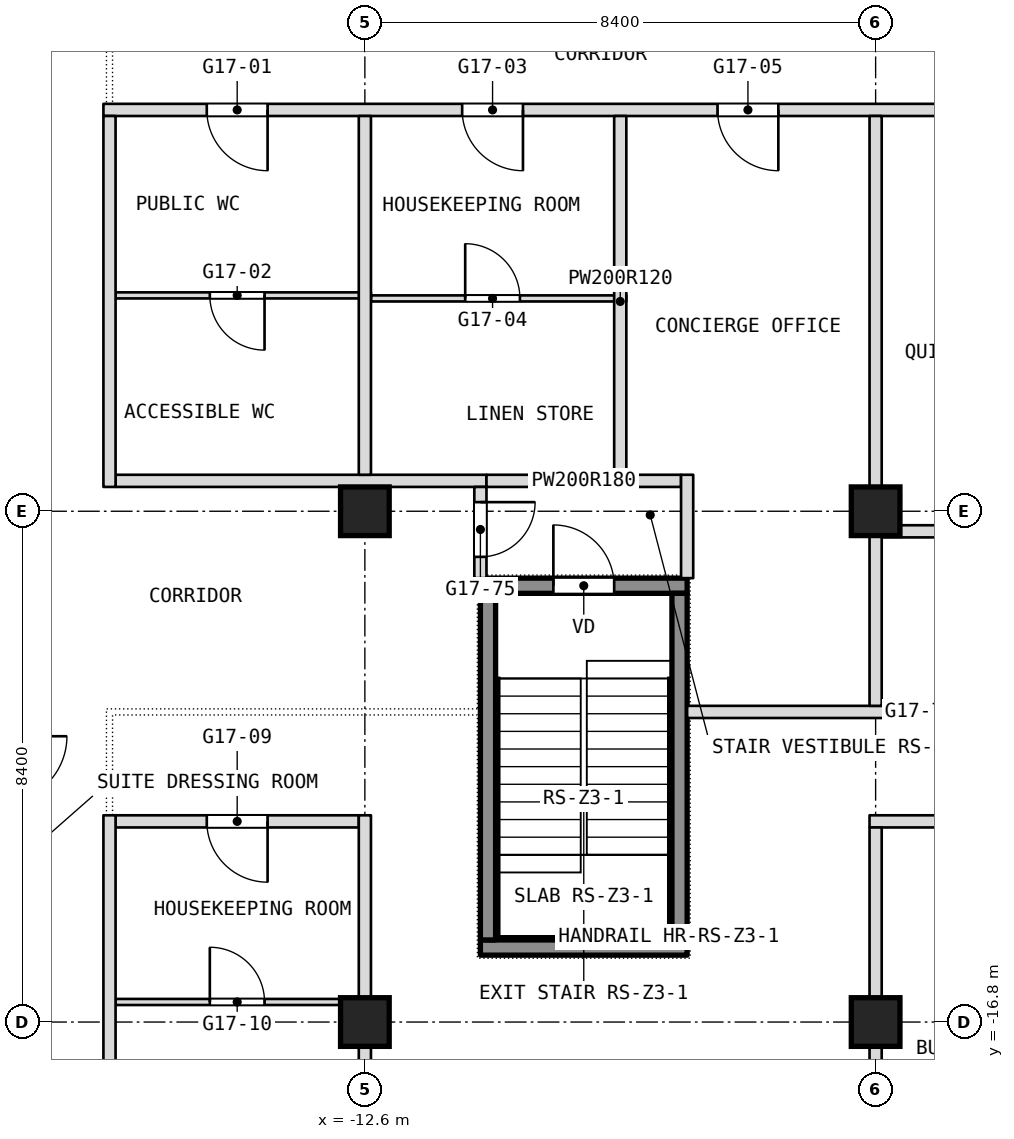
"""IFC4 building model, lengths in metres.
Left out: names, types, materials, properties, quantities, classifications, styles, units other than length and angle.
Written with IfcOpenShell. Run it as: python <this file> out.ifc"""

import sys

from ifc_helpers import new_model, si_unit, direction, frame, frame_2d, origin, origin_2d, place, context, subcontext, project, spatial, rectangle, extrude, element, fill, save


model = new_model("IFC4")
c1 = context("Model", 3, precision=1e-05, world=origin(), true_north=direction((0.0, 1.0)))
c2 = subcontext(c1, "Body", "Model", "MODEL_VIEW")
j1 = project(units=[si_unit("LENGTHUNIT", "METRE"), si_unit("PLANEANGLEUNIT", "RADIAN")], contexts=[c1])
p1 = place(None, origin())
s1 = spatial("IfcSite", under=j1, at=p1, CompositionType="ELEMENT")
p2 = place(p1, origin())
s2 = spatial("IfcBuilding", under=s1, at=p2, CompositionType="ELEMENT")
p3 = place(p2, frame((0.0, 0.0, 212.9)))
s3 = spatial("IfcBuildingStorey", under=s2, at=p3, CompositionType="ELEMENT", Elevation=212.9)
for number, where, z_axis, x_axis in (
    (1, (-12.6, -16.8, 0.0), (0.0, 0.0, 1.0), (1.0, 0.0, 0.0)),
    (2, (-12.6, -8.4, 0.0), (0.0, 0.0, 1.0), (1.0, 0.0, 0.0)),
    (3, (-4.2, -16.8, 0.0), (0.0, 0.0, 1.0), (1.0, 0.0, 0.0)),
    (4, (-4.2, -8.4, 0.0), (0.0, 0.0, 1.0), (1.0, 0.0, 0.0)),
):
    element("IfcColumn", number, at=place(p3, frame(where, z_axis=z_axis, x_axis=x_axis)), inside=s3, PredefinedType="COLUMN", context=c2, shape_type="SweptSolid", body=[
        extrude(rectangle(XDim=0.8, YDim=0.8, at=origin_2d()), origin(), (0.0, 0.0, 1.0), 3.6),
    ])
p4 = place(p3, frame((-16.7, -16.47, 0.0), z_axis=(0.0, 0.0, 1.0), x_axis=(1.0, 0.0, 0.0)))
e5 = element("IfcWall", 5, at=p4, inside=s3, PredefinedType="PARTITIONING", context=c2, shape_type="SweptSolid", body=[
    extrude(rectangle(XDim=4.0, YDim=0.1, at=frame_2d((2.0, 0.0))), origin(), (0.0, 0.0, 1.0), 3.34),
])
p5 = place(p4, frame((1.55, 0.0, 0.0)))
e6 = element("IfcOpeningElement", 6, at=p5, cuts=e5, PredefinedType="OPENING", context=c2, shape_type="SweptSolid", body=[
    extrude(rectangle(XDim=0.9, YDim=2.1, at=frame_2d((0.45, 1.05))), frame((0.0, 0.05, 0.0), z_axis=(0.0, -1.0, 0.0), x_axis=(1.0, 0.0, 0.0)), (0.0, 0.0, 1.0), 0.1),
])
p6 = place(p3, frame((-16.7, -13.5, 0.0), z_axis=(0.0, 0.0, 1.0), x_axis=(1.0, 0.0, 0.0)))
e7 = element("IfcWall", 7, at=p6, inside=s3, PredefinedType="PARTITIONING", context=c2, shape_type="SweptSolid", body=[
    extrude(rectangle(XDim=4.0, YDim=0.2, at=frame_2d((2.0, 0.0))), origin(), (0.0, 0.0, 1.0), 3.34),
])
p7 = place(p6, frame((1.5, 0.0, 0.0)))
e8 = element("IfcOpeningElement", 8, at=p7, cuts=e7, PredefinedType="OPENING", context=c2, shape_type="SweptSolid", body=[
    extrude(rectangle(XDim=1.0, YDim=2.1, at=frame_2d((0.5, 1.05))), frame((0.0, 0.1, 0.0), z_axis=(0.0, -1.0, 0.0), x_axis=(1.0, 0.0, 0.0)), (0.0, 0.0, 1.0), 0.2),
])
p8 = place(p3, frame((-4.3, -13.5, 0.0), z_axis=(0.0, 0.0, 1.0), x_axis=(1.0, 0.0, 0.0)))
e9 = element("IfcWall", 9, at=p8, inside=s3, PredefinedType="PARTITIONING", context=c2, shape_type="SweptSolid", body=[
    extrude(rectangle(XDim=10.0, YDim=0.2, at=frame_2d((5.0, 0.0))), origin(), (0.0, 0.0, 1.0), 3.34),
])
p9 = place(p8, frame((1.7, 0.0, 0.0)))
e10 = element("IfcOpeningElement", 10, at=p9, cuts=e9, PredefinedType="OPENING", context=c2, shape_type="SweptSolid", body=[
    extrude(rectangle(XDim=1.0, YDim=2.1, at=frame_2d((0.5, 1.05))), frame((0.0, 0.1, 0.0), z_axis=(0.0, -1.0, 0.0), x_axis=(1.0, 0.0, 0.0)), (0.0, 0.0, 1.0), 0.2),
])
p10 = place(p8, frame((5.9, 0.0, 0.0)))
e11 = element("IfcOpeningElement", 11, at=p10, cuts=e9, PredefinedType="OPENING", context=c2, shape_type="SweptSolid", body=[
    extrude(rectangle(XDim=1.0, YDim=2.1, at=frame_2d((0.5, 1.05))), frame((0.0, 0.1, 0.0), z_axis=(0.0, -1.0, 0.0), x_axis=(1.0, 0.0, 0.0)), (0.0, 0.0, 1.0), 0.2),
])
p11 = place(p8, frame((8.85, 0.0, 0.0)))
e12 = element("IfcOpeningElement", 12, at=p11, cuts=e9, PredefinedType="OPENING", context=c2, shape_type="SweptSolid", body=[
    extrude(rectangle(XDim=1.0, YDim=2.1, at=frame_2d((0.5, 1.05))), frame((0.0, 0.1, 0.0), z_axis=(0.0, -1.0, 0.0), x_axis=(1.0, 0.0, 0.0)), (0.0, 0.0, 1.0), 0.2),
])
p12 = place(p3, frame((-7.3, -11.7, 0.0), z_axis=(0.0, 0.0, 1.0), x_axis=(1.0, 0.0, 0.0)))
e13 = element("IfcWall", 13, at=p12, inside=s3, PredefinedType="PARTITIONING", context=c2, shape_type="SweptSolid", body=[
    extrude(rectangle(XDim=14.6, YDim=0.2, at=frame_2d((7.3, 0.0))), origin(), (0.0, 0.0, 1.0), 3.34),
])
p13 = place(p12, frame((4.7, 0.0, 0.0)))
e14 = element("IfcOpeningElement", 14, at=p13, cuts=e13, PredefinedType="OPENING", context=c2, shape_type="SweptSolid", body=[
    extrude(rectangle(XDim=1.0, YDim=2.1, at=frame_2d((0.5, 1.05))), frame((0.0, 0.1, 0.0), z_axis=(0.0, -1.0, 0.0), x_axis=(1.0, 0.0, 0.0)), (0.0, 0.0, 1.0), 0.2),
])
p14 = place(p12, frame((8.9, 0.0, 0.0)))
e15 = element("IfcOpeningElement", 15, at=p14, cuts=e13, PredefinedType="OPENING", context=c2, shape_type="SweptSolid", body=[
    extrude(rectangle(XDim=1.0, YDim=2.1, at=frame_2d((0.5, 1.05))), frame((0.0, 0.1, 0.0), z_axis=(0.0, -1.0, 0.0), x_axis=(1.0, 0.0, 0.0)), (0.0, 0.0, 1.0), 0.2),
])
p15 = place(p3, frame((-4.1, -8.73, 0.0), z_axis=(0.0, 0.0, 1.0), x_axis=(1.0, 0.0, 0.0)))
e16 = element("IfcWall", 16, at=p15, inside=s3, PredefinedType="PARTITIONING", context=c2, shape_type="SweptSolid", body=[
    extrude(rectangle(XDim=8.2, YDim=0.2, at=frame_2d((4.1, 0.0))), origin(), (0.0, 0.0, 1.0), 3.34),
])
p16 = place(p3, frame((-16.7, -7.9, 0.0), z_axis=(0.0, 0.0, 1.0), x_axis=(1.0, 0.0, 0.0)))
e17 = element("IfcWall", 17, at=p16, inside=s3, PredefinedType="PARTITIONING", context=c2, shape_type="SweptSolid", body=[
    extrude(rectangle(XDim=6.1, YDim=0.2, at=frame_2d((3.05, 0.0))), origin(), (0.0, 0.0, 1.0), 3.34),
])
p17 = place(p3, frame((-10.6, -7.9, 0.0), z_axis=(0.0, 0.0, 1.0), x_axis=(1.0, 0.0, 0.0)))
e18 = element("IfcWall", 18, at=p17, inside=s3, PredefinedType="PARTITIONING", context=c2, shape_type="SweptSolid", body=[
    extrude(rectangle(XDim=3.2, YDim=0.2, at=frame_2d((1.6, 0.0))), origin(), (0.0, 0.0, 1.0), 3.34),
])
p18 = place(p3, frame((-12.5, -4.9, 0.0), z_axis=(0.0, 0.0, 1.0), x_axis=(1.0, 0.0, 0.0)))
e19 = element("IfcWall", 19, at=p18, inside=s3, PredefinedType="PARTITIONING", context=c2, shape_type="SweptSolid", body=[
    extrude(rectangle(XDim=4.2, YDim=0.1, at=frame_2d((2.1, 0.0))), origin(), (0.0, 0.0, 1.0), 3.34),
])
p19 = place(p18, frame((1.55, 0.0, 0.0)))
e20 = element("IfcOpeningElement", 20, at=p19, cuts=e19, PredefinedType="OPENING", context=c2, shape_type="SweptSolid", body=[
    extrude(rectangle(XDim=0.9, YDim=2.1, at=frame_2d((0.45, 1.05))), frame((0.0, 0.05, 0.0), z_axis=(0.0, -1.0, 0.0), x_axis=(1.0, 0.0, 0.0)), (0.0, 0.0, 1.0), 0.1),
])
p20 = place(p3, frame((-16.7, -4.85, 0.0), z_axis=(0.0, 0.0, 1.0), x_axis=(1.0, 0.0, 0.0)))
e21 = element("IfcWall", 21, at=p20, inside=s3, PredefinedType="PARTITIONING", context=c2, shape_type="SweptSolid", body=[
    extrude(rectangle(XDim=4.2, YDim=0.1, at=frame_2d((2.1, 0.0))), origin(), (0.0, 0.0, 1.0), 3.34),
])
p21 = place(p20, frame((1.55, 0.0, 0.0)))
e22 = element("IfcOpeningElement", 22, at=p21, cuts=e21, PredefinedType="OPENING", context=c2, shape_type="SweptSolid", body=[
    extrude(rectangle(XDim=0.9, YDim=2.1, at=frame_2d((0.45, 1.05))), frame((0.0, 0.05, 0.0), z_axis=(0.0, -1.0, 0.0), x_axis=(1.0, 0.0, 0.0)), (0.0, 0.0, 1.0), 0.1),
])
p22 = place(p3, frame((-16.9, -1.8, 0.0), z_axis=(0.0, 0.0, 1.0), x_axis=(1.0, 0.0, 0.0)))
e23 = element("IfcWall", 23, at=p22, inside=s3, PredefinedType="PARTITIONING", context=c2, shape_type="SweptSolid", body=[
    extrude(rectangle(XDim=33.8, YDim=0.2, at=frame_2d((16.9, 0.0))), origin(), (0.0, 0.0, 1.0), 3.34),
])
p23 = place(p22, frame((1.7, 0.0, 0.0)))
e24 = element("IfcOpeningElement", 24, at=p23, cuts=e23, PredefinedType="OPENING", context=c2, shape_type="SweptSolid", body=[
    extrude(rectangle(XDim=1.0, YDim=2.1, at=frame_2d((0.5, 1.05))), frame((0.0, 0.1, 0.0), z_axis=(0.0, -1.0, 0.0), x_axis=(1.0, 0.0, 0.0)), (0.0, 0.0, 1.0), 0.2),
])
p24 = place(p22, frame((5.9, 0.0, 0.0)))
e25 = element("IfcOpeningElement", 25, at=p24, cuts=e23, PredefinedType="OPENING", context=c2, shape_type="SweptSolid", body=[
    extrude(rectangle(XDim=1.0, YDim=2.1, at=frame_2d((0.5, 1.05))), frame((0.0, 0.1, 0.0), z_axis=(0.0, -1.0, 0.0), x_axis=(1.0, 0.0, 0.0)), (0.0, 0.0, 1.0), 0.2),
])
p25 = place(p22, frame((10.1, 0.0, 0.0)))
e26 = element("IfcOpeningElement", 26, at=p25, cuts=e23, PredefinedType="OPENING", context=c2, shape_type="SweptSolid", body=[
    extrude(rectangle(XDim=1.0, YDim=2.1, at=frame_2d((0.5, 1.05))), frame((0.0, 0.1, 0.0), z_axis=(0.0, -1.0, 0.0), x_axis=(1.0, 0.0, 0.0)), (0.0, 0.0, 1.0), 0.2),
])
p26 = place(p22, frame((22.7, 0.0, 0.0)))
e27 = element("IfcOpeningElement", 27, at=p26, cuts=e23, PredefinedType="OPENING", context=c2, shape_type="SweptSolid", body=[
    extrude(rectangle(XDim=1.0, YDim=2.1, at=frame_2d((0.5, 1.05))), frame((0.0, 0.1, 0.0), z_axis=(0.0, -1.0, 0.0), x_axis=(1.0, 0.0, 0.0)), (0.0, 0.0, 1.0), 0.2),
])
p27 = place(p22, frame((26.9, 0.0, 0.0)))
e28 = element("IfcOpeningElement", 28, at=p27, cuts=e23, PredefinedType="OPENING", context=c2, shape_type="SweptSolid", body=[
    extrude(rectangle(XDim=1.0, YDim=2.1, at=frame_2d((0.5, 1.05))), frame((0.0, 0.1, 0.0), z_axis=(0.0, -1.0, 0.0), x_axis=(1.0, 0.0, 0.0)), (0.0, 0.0, 1.0), 0.2),
])
p28 = place(p22, frame((31.1, 0.0, 0.0)))
e29 = element("IfcOpeningElement", 29, at=p28, cuts=e23, PredefinedType="OPENING", context=c2, shape_type="SweptSolid", body=[
    extrude(rectangle(XDim=1.0, YDim=2.1, at=frame_2d((0.5, 1.05))), frame((0.0, 0.1, 0.0), z_axis=(0.0, -1.0, 0.0), x_axis=(1.0, 0.0, 0.0)), (0.0, 0.0, 1.0), 0.2),
])
p29 = place(p22, frame((14.3, 0.0, 0.0)))
e30 = element("IfcOpeningElement", 30, at=p29, cuts=e23, PredefinedType="OPENING", context=c2, shape_type="SweptSolid", body=[
    extrude(rectangle(XDim=1.0, YDim=2.1, at=frame_2d((0.5, 1.05))), frame((0.0, 0.1, 0.0), z_axis=(0.0, -1.0, 0.0), x_axis=(1.0, 0.0, 0.0)), (0.0, 0.0, 1.0), 0.2),
])
p30 = place(p22, frame((18.5, 0.0, 0.0)))
e31 = element("IfcOpeningElement", 31, at=p30, cuts=e23, PredefinedType="OPENING", context=c2, shape_type="SweptSolid", body=[
    extrude(rectangle(XDim=1.0, YDim=2.1, at=frame_2d((0.5, 1.05))), frame((0.0, 0.1, 0.0), z_axis=(0.0, -1.0, 0.0), x_axis=(1.0, 0.0, 0.0)), (0.0, 0.0, 1.0), 0.2),
])
p31 = place(p3, frame((-4.2, -11.6, 0.0), z_axis=(0.0, 0.0, 1.0), x_axis=(0.0, 1.0, 0.0)))
e32 = element("IfcWall", 32, at=p31, inside=s3, PredefinedType="PARTITIONING", context=c2, shape_type="SweptSolid", body=[
    extrude(rectangle(XDim=9.7, YDim=0.2, at=frame_2d((4.85, 0.0))), origin(), (0.0, 0.0, 1.0), 3.34),
])
p32 = place(p3, frame((-4.2, -20.2, 0.0), z_axis=(0.0, 0.0, 1.0), x_axis=(0.0, 1.0, 0.0)))
e33 = element("IfcWall", 33, at=p32, inside=s3, PredefinedType="PARTITIONING", context=c2, shape_type="SweptSolid", body=[
    extrude(rectangle(XDim=6.6, YDim=0.2, at=frame_2d((3.3, 0.0))), origin(), (0.0, 0.0, 1.0), 3.34),
])
p33 = place(p3, frame((-7.3, -9.5, 0.0), z_axis=(0.0, 0.0, 1.0), x_axis=(0.0, 1.0, 0.0)))
e34 = element("IfcWall", 34, at=p33, inside=s3, PredefinedType="PARTITIONING", context=c2, shape_type="SweptSolid", body=[
    extrude(rectangle(XDim=1.7, YDim=0.2, at=frame_2d((0.85, 0.0))), origin(), (0.0, 0.0, 1.0), 3.34),
])
p34 = place(p3, frame((-8.4, -8.0, 0.0), z_axis=(0.0, 0.0, 1.0), x_axis=(0.0, 1.0, 0.0)))
e35 = element("IfcWall", 35, at=p34, inside=s3, PredefinedType="PARTITIONING", context=c2, shape_type="SweptSolid", body=[
    extrude(rectangle(XDim=6.1, YDim=0.2, at=frame_2d((3.05, 0.0))), origin(), (0.0, 0.0, 1.0), 3.34),
])
p35 = place(p3, frame((-10.7, -9.5, 0.0), z_axis=(0.0, 0.0, 1.0), x_axis=(0.0, 1.0, 0.0)))
e36 = element("IfcWall", 36, at=p35, inside=s3, PredefinedType="PARTITIONING", context=c2, shape_type="SweptSolid", body=[
    extrude(rectangle(XDim=1.5, YDim=0.2, at=frame_2d((0.75, 0.0))), origin(), (0.0, 0.0, 1.0), 3.34),
])
p36 = place(p35, frame((0.35, 0.0, 0.0)))
e37 = element("IfcOpeningElement", 37, at=p36, cuts=e36, PredefinedType="OPENING", context=c2, shape_type="SweptSolid", body=[
    extrude(rectangle(XDim=0.9, YDim=2.1, at=frame_2d((0.45, 1.05))), frame((0.0, 0.1, 0.0), z_axis=(0.0, -1.0, 0.0), x_axis=(1.0, 0.0, 0.0)), (0.0, 0.0, 1.0), 0.2),
])
p37 = place(p3, frame((-12.6, -7.8, 0.0), z_axis=(0.0, 0.0, 1.0), x_axis=(0.0, 1.0, 0.0)))
e38 = element("IfcWall", 38, at=p37, inside=s3, PredefinedType="PARTITIONING", context=c2, shape_type="SweptSolid", body=[
    extrude(rectangle(XDim=5.9, YDim=0.2, at=frame_2d((2.95, 0.0))), origin(), (0.0, 0.0, 1.0), 3.34),
])
for number, where, z_axis, x_axis in (
    (39, (-12.6, -20.2, 0.0), (0.0, 0.0, 1.0), (0.0, 1.0, 0.0)),
    (40, (-16.8, -20.2, 0.0), (0.0, 0.0, 1.0), (0.0, 1.0, 0.0)),
):
    element("IfcWall", number, at=place(p3, frame(where, z_axis=z_axis, x_axis=x_axis)), inside=s3, PredefinedType="PARTITIONING", context=c2, shape_type="SweptSolid", body=[
        extrude(rectangle(XDim=6.8, YDim=0.2, at=frame_2d((3.4, 0.0))), origin(), (0.0, 0.0, 1.0), 3.34),
    ])
p38 = place(p3, frame((-16.8, -8.0, 0.0), z_axis=(0.0, 0.0, 1.0), x_axis=(0.0, 1.0, 0.0)))
e41 = element("IfcWall", 41, at=p38, inside=s3, PredefinedType="PARTITIONING", context=c2, shape_type="SweptSolid", body=[
    extrude(rectangle(XDim=6.1, YDim=0.2, at=frame_2d((3.05, 0.0))), origin(), (0.0, 0.0, 1.0), 3.34),
])
p39 = place(p3, frame((-10.7, -15.575, 0.1), z_axis=(0.0, 0.0, 1.0), x_axis=(1.0, 0.0, 0.0)))
e42 = element("IfcWall", 42, at=p39, inside=s3, PredefinedType="SHEAR", context=c2, shape_type="SweptSolid", body=[
    extrude(rectangle(XDim=3.4, YDim=0.25, at=frame_2d((1.7, 0.0))), origin(), (0.0, 0.0, 1.0), 3.6),
])
p40 = place(p3, frame((-10.7, -9.625, 0.1), z_axis=(0.0, 0.0, 1.0), x_axis=(1.0, 0.0, 0.0)))
e43 = element("IfcWall", 43, at=p40, inside=s3, PredefinedType="SHEAR", context=c2, shape_type="SweptSolid", body=[
    extrude(rectangle(XDim=3.4, YDim=0.25, at=frame_2d((1.7, 0.0))), origin(), (0.0, 0.0, 1.0), 3.6),
])
p41 = place(p40, frame((1.2, 0.0, 0.0)))
e44 = element("IfcOpeningElement", 44, at=p41, cuts=e43, PredefinedType="OPENING", context=c2, shape_type="SweptSolid", body=[
    extrude(rectangle(XDim=1.0, YDim=2.1, at=frame_2d((0.5, 1.05))), frame((0.0, 0.125, 0.0), z_axis=(0.0, -1.0, 0.0), x_axis=(1.0, 0.0, 0.0)), (0.0, 0.0, 1.0), 0.25),
])
for number, where, z_axis, x_axis in (
    (45, (-10.575, -15.45, 0.1), (0.0, 0.0, 1.0), (0.0, 1.0, 0.0)),
    (46, (-7.425, -15.45, 0.1), (0.0, 0.0, 1.0), (0.0, 1.0, 0.0)),
):
    element("IfcWall", number, at=place(p3, frame(where, z_axis=z_axis, x_axis=x_axis)), inside=s3, PredefinedType="SHEAR", context=c2, shape_type="SweptSolid", body=[
        extrude(rectangle(XDim=5.7, YDim=0.25, at=frame_2d((2.85, 0.0))), origin(), (0.0, 0.0, 1.0), 3.6),
    ])
p42 = place(p5, origin())
e47 = element("IfcDoor", 47, at=p42, inside=s3, OperationType="SINGLE_SWING_LEFT", PredefinedType="DOOR", context=c2, shape_type="SweptSolid", body=[
    extrude(rectangle(XDim=0.9, YDim=2.1, at=frame_2d((0.45, 1.05))), frame((0.0, 0.025, 0.0), z_axis=(0.0, -1.0, 0.0), x_axis=(1.0, 0.0, 0.0)), (0.0, 0.0, 1.0), 0.05),
])
fill(e6, e47)
p43 = place(p7, origin())
e48 = element("IfcDoor", 48, at=p43, inside=s3, OperationType="SINGLE_SWING_LEFT", PredefinedType="DOOR", context=c2, shape_type="SweptSolid", body=[
    extrude(rectangle(XDim=1.0, YDim=2.1, at=frame_2d((0.5, 1.05))), frame((0.0, 0.025, 0.0), z_axis=(0.0, -1.0, 0.0), x_axis=(1.0, 0.0, 0.0)), (0.0, 0.0, 1.0), 0.05),
])
fill(e8, e48)
p44 = place(p19, origin())
e49 = element("IfcDoor", 49, at=p44, inside=s3, OperationType="SINGLE_SWING_RIGHT", PredefinedType="DOOR", context=c2, shape_type="SweptSolid", body=[
    extrude(rectangle(XDim=0.9, YDim=2.1, at=frame_2d((0.45, 1.05))), frame((0.0, 0.025, 0.0), z_axis=(0.0, -1.0, 0.0), x_axis=(1.0, 0.0, 0.0)), (0.0, 0.0, 1.0), 0.05),
])
fill(e20, e49)
p45 = place(p21, origin())
e50 = element("IfcDoor", 50, at=p45, inside=s3, OperationType="SINGLE_SWING_RIGHT", PredefinedType="DOOR", context=c2, shape_type="SweptSolid", body=[
    extrude(rectangle(XDim=0.9, YDim=2.1, at=frame_2d((0.45, 1.05))), frame((0.0, 0.025, 0.0), z_axis=(0.0, -1.0, 0.0), x_axis=(1.0, 0.0, 0.0)), (0.0, 0.0, 1.0), 0.05),
])
fill(e22, e50)
p46 = place(p23, origin())
e51 = element("IfcDoor", 51, at=p46, inside=s3, OperationType="SINGLE_SWING_LEFT", PredefinedType="DOOR", context=c2, shape_type="SweptSolid", body=[
    extrude(rectangle(XDim=1.0, YDim=2.1, at=frame_2d((0.5, 1.05))), frame((0.0, 0.025, 0.0), z_axis=(0.0, -1.0, 0.0), x_axis=(1.0, 0.0, 0.0)), (0.0, 0.0, 1.0), 0.05),
])
fill(e24, e51)
p47 = place(p24, origin())
e52 = element("IfcDoor", 52, at=p47, inside=s3, OperationType="SINGLE_SWING_LEFT", PredefinedType="DOOR", context=c2, shape_type="SweptSolid", body=[
    extrude(rectangle(XDim=1.0, YDim=2.1, at=frame_2d((0.5, 1.05))), frame((0.0, 0.025, 0.0), z_axis=(0.0, -1.0, 0.0), x_axis=(1.0, 0.0, 0.0)), (0.0, 0.0, 1.0), 0.05),
])
fill(e25, e52)
p48 = place(p25, origin())
e53 = element("IfcDoor", 53, at=p48, inside=s3, OperationType="SINGLE_SWING_RIGHT", PredefinedType="DOOR", context=c2, shape_type="SweptSolid", body=[
    extrude(rectangle(XDim=1.0, YDim=2.1, at=frame_2d((0.5, 1.05))), frame((0.0, 0.025, 0.0), z_axis=(0.0, -1.0, 0.0), x_axis=(1.0, 0.0, 0.0)), (0.0, 0.0, 1.0), 0.05),
])
fill(e26, e53)
p49 = place(p36, origin())
e54 = element("IfcDoor", 54, at=p49, inside=s3, OperationType="SINGLE_SWING_LEFT", PredefinedType="DOOR", context=c2, shape_type="SweptSolid", body=[
    extrude(rectangle(XDim=0.9, YDim=2.1, at=frame_2d((0.45, 1.05))), frame((0.0, 0.025, 0.0), z_axis=(0.0, -1.0, 0.0), x_axis=(1.0, 0.0, 0.0)), (0.0, 0.0, 1.0), 0.05),
])
fill(e37, e54)
p50 = place(p41, origin())
e55 = element("IfcDoor", 55, at=p50, inside=s3, OperationType="SINGLE_SWING_LEFT", PredefinedType="DOOR", context=c2, shape_type="SweptSolid", body=[
    extrude(rectangle(XDim=1.0, YDim=2.1, at=frame_2d((0.5, 1.05))), frame((0.0, 0.025, 0.0), z_axis=(0.0, -1.0, 0.0), x_axis=(1.0, 0.0, 0.0)), (0.0, 0.0, 1.0), 0.05),
])
fill(e44, e55)
save(model, sys.argv[1])
